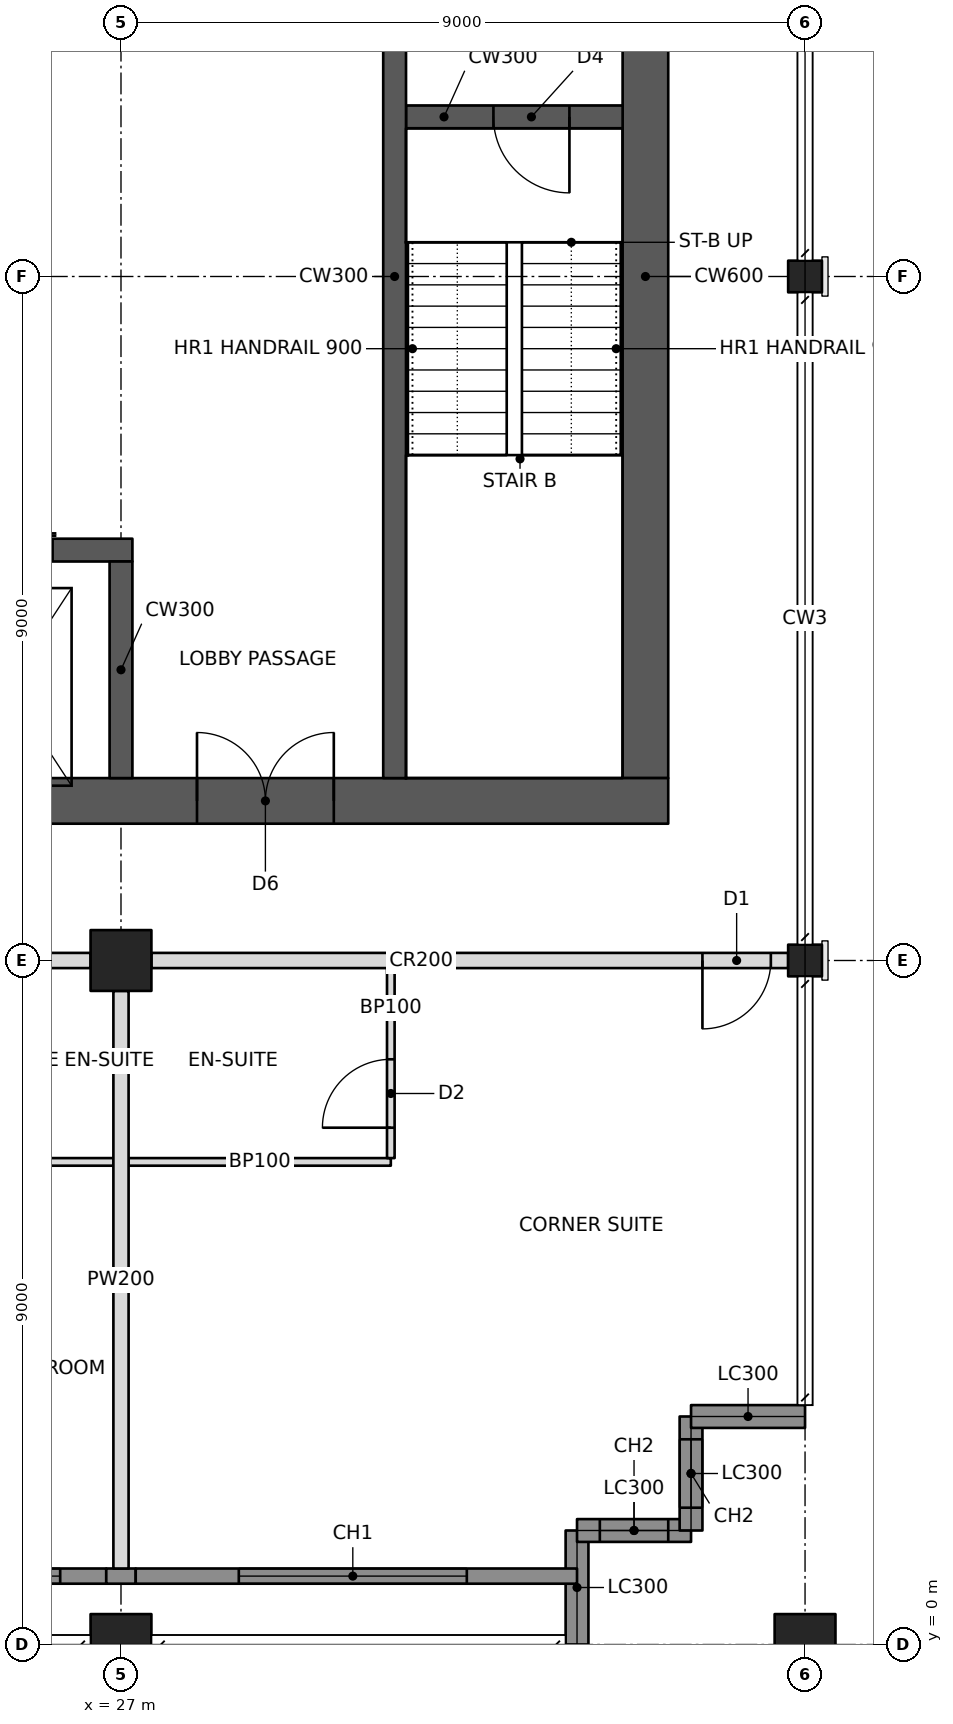
"""IFC4 building model, lengths in metres.
Left out: names, types, materials, properties, quantities, classifications, styles, units other than length and angle.
Written with IfcOpenShell. Run it as: python <this file> out.ifc"""

import sys

from ifc_helpers import new_model, si_unit, direction, frame, frame_2d, origin, origin_2d, place, context, subcontext, project, spatial, rectangle, hollow_rectangle, i_section, extrude, element, fill, save


model = new_model("IFC4")
c1 = context("Model", 3, precision=1e-05, world=origin(), true_north=direction((0.0, 1.0)))
c2 = subcontext(c1, "Body", "Model", "MODEL_VIEW")
j1 = project(units=[si_unit("LENGTHUNIT", "METRE"), si_unit("PLANEANGLEUNIT", "RADIAN")], contexts=[c1])
p1 = place(None, origin())
s1 = spatial("IfcSite", under=j1, at=p1, CompositionType="ELEMENT")
p2 = place(p1, origin())
s2 = spatial("IfcBuilding", under=s1, at=p2, CompositionType="ELEMENT")
p3 = place(p2, frame((0.0, 0.0, 259.0)))
s3 = spatial("IfcBuildingStorey", under=s2, at=p3, CompositionType="ELEMENT", Elevation=259.0)
for number, where, z_axis, x_axis in (
    (1, (27.0, 0.0, 0.0), (0.0, 0.0, 1.0), (1.0, 0.0, 0.0)),
    (2, (27.0, 9.0, 0.0), (0.0, 0.0, 1.0), (1.0, 0.0, 0.0)),
    (3, (36.0, 0.0, 0.0), (0.0, 0.0, 1.0), (1.0, 0.0, 0.0)),
):
    element("IfcColumn", number, at=place(p3, frame(where, z_axis=z_axis, x_axis=x_axis)), inside=s3, PredefinedType="COLUMN", context=c2, shape_type="SweptSolid", body=[
        extrude(hollow_rectangle(XDim=0.8, YDim=0.8, WallThickness=0.032, at=origin_2d()), origin(), (0.0, 0.0, 1.0), 3.6),
    ])
for number, where, z_axis, x_axis in (
    (4, (36.0, 9.0, 0.0), (0.0, 0.0, 1.0), (0.0, 1.0, 0.0)),
    (5, (36.0, 18.0, 0.0), (0.0, 0.0, 1.0), (0.0, 1.0, 0.0)),
):
    element("IfcColumn", number, at=place(p3, frame(where, z_axis=z_axis, x_axis=x_axis)), inside=s3, PredefinedType="COLUMN", context=c2, shape_type="SweptSolid", body=[
        extrude(i_section(OverallWidth=0.417, OverallDepth=0.445, WebThickness=0.039, FlangeThickness=0.063, at=origin_2d()), origin(), (0.0, 0.0, 1.0), 3.6),
    ])
p4 = place(p3, frame((10.8, 11.1, 0.0), z_axis=(0.0, 0.0, 1.0), x_axis=(1.0, 0.0, 0.0)))
e6 = element("IfcWall", 6, at=p4, inside=s3, PredefinedType="SHEAR", context=c2, shape_type="SweptSolid", body=[
    extrude(rectangle(XDim=23.4, YDim=0.6, at=frame_2d((11.7, 0.0))), origin(), (0.0, 0.0, 1.0), 3.6),
])
p5 = place(p4, frame((1.0, 0.0, 0.0)))
e7 = element("IfcOpeningElement", 7, at=p5, cuts=e6, PredefinedType="OPENING", context=c2, shape_type="SweptSolid", body=[
    extrude(rectangle(XDim=1.0, YDim=2.1, at=frame_2d((0.5, 1.05))), frame((0.0, 0.31, 0.0), z_axis=(0.0, -1.0, 0.0), x_axis=(1.0, 0.0, 0.0)), (0.0, 0.0, 1.0), 0.62),
])
p6 = place(p4, frame((17.2, 0.0, 0.0)))
e8 = element("IfcOpeningElement", 8, at=p6, cuts=e6, PredefinedType="OPENING", context=c2, shape_type="SweptSolid", body=[
    extrude(rectangle(XDim=1.8, YDim=2.1, at=frame_2d((0.9, 1.05))), frame((0.0, 0.31, 0.0), z_axis=(0.0, -1.0, 0.0), x_axis=(1.0, 0.0, 0.0)), (0.0, 0.0, 1.0), 0.62),
])
p7 = place(p3, frame((33.9, 11.4, 0.0), z_axis=(0.0, 0.0, 1.0), x_axis=(0.0, 1.0, 0.0)))
e9 = element("IfcWall", 9, at=p7, inside=s3, PredefinedType="SHEAR", context=c2, shape_type="SweptSolid", body=[
    extrude(rectangle(XDim=13.2, YDim=0.6, at=frame_2d((6.6, 0.0))), origin(), (0.0, 0.0, 1.0), 3.6),
])
p8 = place(p3, frame((18.15, 14.4, 0.0), z_axis=(0.0, 0.0, 1.0), x_axis=(1.0, 0.0, 0.0)))
e10 = element("IfcWall", 10, at=p8, inside=s3, PredefinedType="SHEAR", context=c2, shape_type="SweptSolid", body=[
    extrude(rectangle(XDim=9.0, YDim=0.3, at=frame_2d((4.5, 0.0))), origin(), (0.0, 0.0, 1.0), 3.6),
])
p9 = place(p8, frame((0.8, 0.0, 0.0)))
e11 = element("IfcOpeningElement", 11, at=p9, cuts=e10, PredefinedType="OPENING", context=c2, shape_type="SweptSolid", body=[
    extrude(rectangle(XDim=1.1, YDim=2.1, at=frame_2d((0.55, 1.05))), frame((0.0, 0.16, 0.0), z_axis=(0.0, -1.0, 0.0), x_axis=(1.0, 0.0, 0.0)), (0.0, 0.0, 1.0), 0.32),
])
p10 = place(p8, frame((6.75, 0.0, 0.0)))
e12 = element("IfcOpeningElement", 12, at=p10, cuts=e10, PredefinedType="OPENING", context=c2, shape_type="SweptSolid", body=[
    extrude(rectangle(XDim=1.2, YDim=2.1, at=frame_2d((0.6, 1.05))), frame((0.0, 0.16, 0.0), z_axis=(0.0, -1.0, 0.0), x_axis=(1.0, 0.0, 0.0)), (0.0, 0.0, 1.0), 0.32),
])
p11 = place(p8, frame((3.8, 0.0, 0.0)))
e13 = element("IfcOpeningElement", 13, at=p11, cuts=e10, PredefinedType="OPENING", context=c2, shape_type="SweptSolid", body=[
    extrude(rectangle(XDim=1.1, YDim=2.1, at=frame_2d((0.55, 1.05))), frame((0.0, 0.16, 0.0), z_axis=(0.0, -1.0, 0.0), x_axis=(1.0, 0.0, 0.0)), (0.0, 0.0, 1.0), 0.32),
])
p12 = place(p3, frame((27.0, 11.4, 0.0), z_axis=(0.0, 0.0, 1.0), x_axis=(0.0, 1.0, 0.0)))
e14 = element("IfcWall", 14, at=p12, inside=s3, PredefinedType="SHEAR", context=c2, shape_type="SweptSolid", body=[
    extrude(rectangle(XDim=2.85, YDim=0.3, at=frame_2d((1.425, 0.0))), origin(), (0.0, 0.0, 1.0), 3.6),
])
p13 = place(p3, frame((30.6, 11.4, 0.0), z_axis=(0.0, 0.0, 1.0), x_axis=(0.0, 1.0, 0.0)))
e15 = element("IfcWall", 15, at=p13, inside=s3, PredefinedType="SHEAR", context=c2, shape_type="SweptSolid", body=[
    extrude(rectangle(XDim=13.2, YDim=0.3, at=frame_2d((6.6, 0.0))), origin(), (0.0, 0.0, 1.0), 3.6),
])
p14 = place(p3, frame((30.75, 20.1, 0.0), z_axis=(0.0, 0.0, 1.0), x_axis=(1.0, 0.0, 0.0)))
e16 = element("IfcWall", 16, at=p14, inside=s3, PredefinedType="SHEAR", context=c2, shape_type="SweptSolid", body=[
    extrude(rectangle(XDim=2.85, YDim=0.3, at=frame_2d((1.425, 0.0))), origin(), (0.0, 0.0, 1.0), 3.6),
])
p15 = place(p14, frame((1.15, 0.0, 0.0)))
e17 = element("IfcOpeningElement", 17, at=p15, cuts=e16, PredefinedType="OPENING", context=c2, shape_type="SweptSolid", body=[
    extrude(rectangle(XDim=1.0, YDim=2.1, at=frame_2d((0.5, 1.05))), frame((0.0, 0.16, 0.0), z_axis=(0.0, -1.0, 0.0), x_axis=(1.0, 0.0, 0.0)), (0.0, 0.0, 1.0), 0.32),
])
p16 = place(p3, frame((33.0, 0.0, 0.0), z_axis=(0.0, 0.0, 1.0), x_axis=(0.0, 1.0, 0.0)))
e18 = element("IfcWall", 18, at=p16, inside=s3, PredefinedType="SOLIDWALL", context=c2, shape_type="SweptSolid", body=[
    extrude(rectangle(XDim=1.5, YDim=0.3, at=frame_2d((0.75, 0.0))), origin(), (0.0, 0.0, 1.0), 2.62),
])
p17 = place(p3, frame((33.0, 1.5, 0.0), z_axis=(0.0, 0.0, 1.0), x_axis=(1.0, 0.0, 0.0)))
e19 = element("IfcWall", 19, at=p17, inside=s3, PredefinedType="SOLIDWALL", context=c2, shape_type="SweptSolid", body=[
    extrude(rectangle(XDim=1.5, YDim=0.3, at=frame_2d((0.75, 0.0))), origin(), (0.0, 0.0, 1.0), 3.4),
])
p18 = place(p17, frame((0.3, 0.0, 0.6)))
e20 = element("IfcOpeningElement", 20, at=p18, cuts=e19, PredefinedType="OPENING", context=c2, shape_type="SweptSolid", body=[
    extrude(rectangle(XDim=0.9, YDim=2.2, at=frame_2d((0.45, 1.1))), frame((0.0, 0.16, 0.0), z_axis=(0.0, -1.0, 0.0), x_axis=(1.0, 0.0, 0.0)), (0.0, 0.0, 1.0), 0.32),
])
p19 = place(p3, frame((34.5, 1.5, 0.0), z_axis=(0.0, 0.0, 1.0), x_axis=(0.0, 1.0, 0.0)))
e21 = element("IfcWall", 21, at=p19, inside=s3, PredefinedType="SOLIDWALL", context=c2, shape_type="SweptSolid", body=[
    extrude(rectangle(XDim=1.5, YDim=0.3, at=frame_2d((0.75, 0.0))), origin(), (0.0, 0.0, 1.0), 3.4),
])
p20 = place(p19, frame((0.3, 0.0, 0.6)))
e22 = element("IfcOpeningElement", 22, at=p20, cuts=e21, PredefinedType="OPENING", context=c2, shape_type="SweptSolid", body=[
    extrude(rectangle(XDim=0.9, YDim=2.2, at=frame_2d((0.45, 1.1))), frame((0.0, 0.16, 0.0), z_axis=(0.0, -1.0, 0.0), x_axis=(1.0, 0.0, 0.0)), (0.0, 0.0, 1.0), 0.32),
])
p21 = place(p3, frame((34.5, 3.0, 0.0), z_axis=(0.0, 0.0, 1.0), x_axis=(1.0, 0.0, 0.0)))
e23 = element("IfcWall", 23, at=p21, inside=s3, PredefinedType="SOLIDWALL", context=c2, shape_type="SweptSolid", body=[
    extrude(rectangle(XDim=1.5, YDim=0.3, at=frame_2d((0.75, 0.0))), origin(), (0.0, 0.0, 1.0), 2.62),
])
p22 = place(p3, frame((18.4, 9.0, 0.0), z_axis=(0.0, 0.0, 1.0), x_axis=(1.0, 0.0, 0.0)))
e24 = element("IfcWall", 24, at=p22, inside=s3, PredefinedType="PARTITIONING", context=c2, shape_type="SweptSolid", body=[
    extrude(rectangle(XDim=8.2, YDim=0.2, at=frame_2d((4.1, 0.0))), origin(), (0.0, 0.0, 1.0), 2.605),
])
p23 = place(p22, frame((2.95, 0.0, 0.0)))
e25 = element("IfcOpeningElement", 25, at=p23, cuts=e24, PredefinedType="OPENING", context=c2, shape_type="SweptSolid", body=[
    extrude(rectangle(XDim=0.9, YDim=2.1, at=frame_2d((0.45, 1.05))), frame((0.0, 0.11, 0.0), z_axis=(0.0, -1.0, 0.0), x_axis=(1.0, 0.0, 0.0)), (0.0, 0.0, 1.0), 0.22),
])
p24 = place(p22, frame((4.35, 0.0, 0.0)))
e26 = element("IfcOpeningElement", 26, at=p24, cuts=e24, PredefinedType="OPENING", context=c2, shape_type="SweptSolid", body=[
    extrude(rectangle(XDim=0.9, YDim=2.1, at=frame_2d((0.45, 1.05))), frame((0.0, 0.11, 0.0), z_axis=(0.0, -1.0, 0.0), x_axis=(1.0, 0.0, 0.0)), (0.0, 0.0, 1.0), 0.22),
])
p25 = place(p3, frame((27.4, 9.0, 0.0), z_axis=(0.0, 0.0, 1.0), x_axis=(1.0, 0.0, 0.0)))
e27 = element("IfcWall", 27, at=p25, inside=s3, PredefinedType="PARTITIONING", context=c2, shape_type="SweptSolid", body=[
    extrude(rectangle(XDim=8.378, YDim=0.2, at=frame_2d((4.189, 0.0))), origin(), (0.0, 0.0, 1.0), 2.605),
])
p26 = place(p25, frame((7.25, 0.0, 0.0)))
e28 = element("IfcOpeningElement", 28, at=p26, cuts=e27, PredefinedType="OPENING", context=c2, shape_type="SweptSolid", body=[
    extrude(rectangle(XDim=0.9, YDim=2.1, at=frame_2d((0.45, 1.05))), frame((0.0, 0.11, 0.0), z_axis=(0.0, -1.0, 0.0), x_axis=(1.0, 0.0, 0.0)), (0.0, 0.0, 1.0), 0.22),
])
p27 = place(p3, frame((27.0, 8.6, 0.0), z_axis=(0.0, 0.0, 1.0), x_axis=(0.0, -1.0, 0.0)))
e29 = element("IfcWall", 29, at=p27, inside=s3, PredefinedType="PARTITIONING", context=c2, shape_type="SweptSolid", body=[
    extrude(rectangle(XDim=7.6, YDim=0.2, at=frame_2d((3.8, 0.0))), origin(), (0.0, 0.0, 1.0), 2.605),
])
p28 = place(p3, frame((23.95, 6.35, 0.0), z_axis=(0.0, 0.0, 1.0), x_axis=(1.0, 0.0, 0.0)))
e30 = element("IfcWall", 30, at=p28, inside=s3, PredefinedType="PARTITIONING", context=c2, shape_type="SweptSolid", body=[
    extrude(rectangle(XDim=2.95, YDim=0.1, at=frame_2d((1.475, 0.0))), origin(), (0.0, 0.0, 1.0), 2.604),
])
p29 = place(p3, frame((27.1, 6.35, 0.0), z_axis=(0.0, 0.0, 1.0), x_axis=(1.0, 0.0, 0.0)))
e31 = element("IfcWall", 31, at=p29, inside=s3, PredefinedType="PARTITIONING", context=c2, shape_type="SweptSolid", body=[
    extrude(rectangle(XDim=3.45, YDim=0.1, at=frame_2d((1.725, 0.0))), origin(), (0.0, 0.0, 1.0), 2.604),
])
p30 = place(p3, frame((30.55, 8.9, 0.0), z_axis=(0.0, 0.0, 1.0), x_axis=(0.0, -1.0, 0.0)))
e32 = element("IfcWall", 32, at=p30, inside=s3, PredefinedType="PARTITIONING", context=c2, shape_type="SweptSolid", body=[
    extrude(rectangle(XDim=2.5, YDim=0.1, at=frame_2d((1.25, 0.0))), origin(), (0.0, 0.0, 1.0), 2.604),
])
p31 = place(p30, frame((1.2, 0.0, 0.0)))
e33 = element("IfcOpeningElement", 33, at=p31, cuts=e32, PredefinedType="OPENING", context=c2, shape_type="SweptSolid", body=[
    extrude(rectangle(XDim=0.9, YDim=2.1, at=frame_2d((0.45, 1.05))), frame((0.0, 0.06, 0.0), z_axis=(0.0, -1.0, 0.0), x_axis=(1.0, 0.0, 0.0)), (0.0, 0.0, 1.0), 0.12),
])
p32 = place(p3, frame((18.194, 0.9, 0.0), z_axis=(0.0, 0.0, 1.0), x_axis=(1.0, 0.0, 0.0)))
e34 = element("IfcWall", 34, at=p32, inside=s3, PredefinedType="SOLIDWALL", context=c2, shape_type="SweptSolid", body=[
    extrude(rectangle(XDim=8.612, YDim=0.2, at=frame_2d((4.306, 0.0))), origin(), (0.0, 0.0, 1.0), 3.4),
])
p33 = place(p32, frame((0.606, 0.0, 0.6)))
e35 = element("IfcOpeningElement", 35, at=p33, cuts=e34, PredefinedType="OPENING", context=c2, shape_type="SweptSolid", body=[
    extrude(rectangle(XDim=3.0, YDim=2.2, at=frame_2d((1.5, 1.1))), frame((0.0, 0.11, 0.0), z_axis=(0.0, -1.0, 0.0), x_axis=(1.0, 0.0, 0.0)), (0.0, 0.0, 1.0), 0.22),
])
p34 = place(p32, frame((5.006, 0.0, 0.6)))
e36 = element("IfcOpeningElement", 36, at=p34, cuts=e34, PredefinedType="OPENING", context=c2, shape_type="SweptSolid", body=[
    extrude(rectangle(XDim=3.0, YDim=2.2, at=frame_2d((1.5, 1.1))), frame((0.0, 0.11, 0.0), z_axis=(0.0, -1.0, 0.0), x_axis=(1.0, 0.0, 0.0)), (0.0, 0.0, 1.0), 0.22),
])
p35 = place(p3, frame((26.806, 0.9, 0.0), z_axis=(0.0, 0.0, 1.0), x_axis=(1.0, 0.0, 0.0)))
e37 = element("IfcWall", 37, at=p35, inside=s3, PredefinedType="SOLIDWALL", context=c2, shape_type="SweptSolid", body=[
    extrude(rectangle(XDim=0.388, YDim=0.2, at=frame_2d((0.194, 0.0))), origin(), (0.0, 0.0, 1.0), 2.604),
])
p36 = place(p3, frame((27.194, 0.9, 0.0), z_axis=(0.0, 0.0, 1.0), x_axis=(1.0, 0.0, 0.0)))
e38 = element("IfcWall", 38, at=p36, inside=s3, PredefinedType="SOLIDWALL", context=c2, shape_type="SweptSolid", body=[
    extrude(rectangle(XDim=5.806, YDim=0.2, at=frame_2d((2.903, 0.0))), origin(), (0.0, 0.0, 1.0), 3.4),
])
p37 = place(p36, frame((1.356, 0.0, 0.6)))
e39 = element("IfcOpeningElement", 39, at=p37, cuts=e38, PredefinedType="OPENING", context=c2, shape_type="SweptSolid", body=[
    extrude(rectangle(XDim=3.0, YDim=2.2, at=frame_2d((1.5, 1.1))), frame((0.0, 0.11, 0.0), z_axis=(0.0, -1.0, 0.0), x_axis=(1.0, 0.0, 0.0)), (0.0, 0.0, 1.0), 0.22),
])
p38 = place(p18, origin())
e40 = element("IfcWindow", 40, at=p38, inside=s3, PartitioningType="SINGLE_PANEL", PredefinedType="WINDOW", context=c2, shape_type="SweptSolid", body=[
    extrude(rectangle(XDim=0.9, YDim=2.2, at=frame_2d((0.45, 1.1))), frame((0.0, 0.03, 0.0), z_axis=(0.0, -1.0, 0.0), x_axis=(1.0, 0.0, 0.0)), (0.0, 0.0, 1.0), 0.06),
])
fill(e20, e40)
p39 = place(p20, origin())
e41 = element("IfcWindow", 41, at=p39, inside=s3, PartitioningType="SINGLE_PANEL", PredefinedType="WINDOW", context=c2, shape_type="SweptSolid", body=[
    extrude(rectangle(XDim=0.9, YDim=2.2, at=frame_2d((0.45, 1.1))), frame((0.0, 0.03, 0.0), z_axis=(0.0, -1.0, 0.0), x_axis=(1.0, 0.0, 0.0)), (0.0, 0.0, 1.0), 0.06),
])
fill(e22, e41)
p40 = place(p34, origin())
e42 = element("IfcWindow", 42, at=p40, inside=s3, PartitioningType="TRIPLE_PANEL_VERTICAL", PredefinedType="WINDOW", context=c2, shape_type="SweptSolid", body=[
    extrude(rectangle(XDim=3.0, YDim=2.2, at=frame_2d((1.5, 1.1))), frame((0.0, 0.03, 0.0), z_axis=(0.0, -1.0, 0.0), x_axis=(1.0, 0.0, 0.0)), (0.0, 0.0, 1.0), 0.06),
])
fill(e36, e42)
p41 = place(p37, origin())
e43 = element("IfcWindow", 43, at=p41, inside=s3, PartitioningType="TRIPLE_PANEL_VERTICAL", PredefinedType="WINDOW", context=c2, shape_type="SweptSolid", body=[
    extrude(rectangle(XDim=3.0, YDim=2.2, at=frame_2d((1.5, 1.1))), frame((0.0, 0.03, 0.0), z_axis=(0.0, -1.0, 0.0), x_axis=(1.0, 0.0, 0.0)), (0.0, 0.0, 1.0), 0.06),
])
fill(e39, e43)
p42 = place(p31, frame((0.9, 0.0, 0.0), z_axis=(0.0, 0.0, 1.0), x_axis=(-1.0, 0.0, 0.0)))
e44 = element("IfcDoor", 44, at=p42, inside=s3, OperationType="SINGLE_SWING_LEFT", PredefinedType="DOOR", context=c2, shape_type="SweptSolid", body=[
    extrude(rectangle(XDim=0.9, YDim=2.1, at=frame_2d((0.45, 1.05))), frame((0.0, 0.025, 0.0), z_axis=(0.0, -1.0, 0.0), x_axis=(1.0, 0.0, 0.0)), (0.0, 0.0, 1.0), 0.05),
])
fill(e33, e44)
p43 = place(p26, frame((0.9, 0.0, 0.0), z_axis=(0.0, 0.0, 1.0), x_axis=(-1.0, 0.0, 0.0)))
e45 = element("IfcDoor", 45, at=p43, inside=s3, OperationType="SINGLE_SWING_RIGHT", PredefinedType="DOOR", context=c2, shape_type="SweptSolid", body=[
    extrude(rectangle(XDim=0.9, YDim=2.1, at=frame_2d((0.45, 1.05))), frame((0.0, 0.025, 0.0), z_axis=(0.0, -1.0, 0.0), x_axis=(1.0, 0.0, 0.0)), (0.0, 0.0, 1.0), 0.05),
])
fill(e28, e45)
p44 = place(p6, origin())
e46 = element("IfcDoor", 46, at=p44, inside=s3, OperationType="DOUBLE_DOOR_SINGLE_SWING", PredefinedType="DOOR", context=c2, shape_type="SweptSolid", body=[
    extrude(rectangle(XDim=1.8, YDim=2.1, at=frame_2d((0.9, 1.05))), frame((0.0, 0.025, 0.0), z_axis=(0.0, -1.0, 0.0), x_axis=(1.0, 0.0, 0.0)), (0.0, 0.0, 1.0), 0.05),
])
fill(e8, e46)
p45 = place(p15, frame((1.0, 0.0, 0.0), z_axis=(0.0, 0.0, 1.0), x_axis=(-1.0, 0.0, 0.0)))
e47 = element("IfcDoor", 47, at=p45, inside=s3, OperationType="SINGLE_SWING_LEFT", PredefinedType="DOOR", context=c2, shape_type="SweptSolid", body=[
    extrude(rectangle(XDim=1.0, YDim=2.1, at=frame_2d((0.5, 1.05))), frame((0.0, 0.025, 0.0), z_axis=(0.0, -1.0, 0.0), x_axis=(1.0, 0.0, 0.0)), (0.0, 0.0, 1.0), 0.05),
])
fill(e17, e47)
save(model, sys.argv[1])
